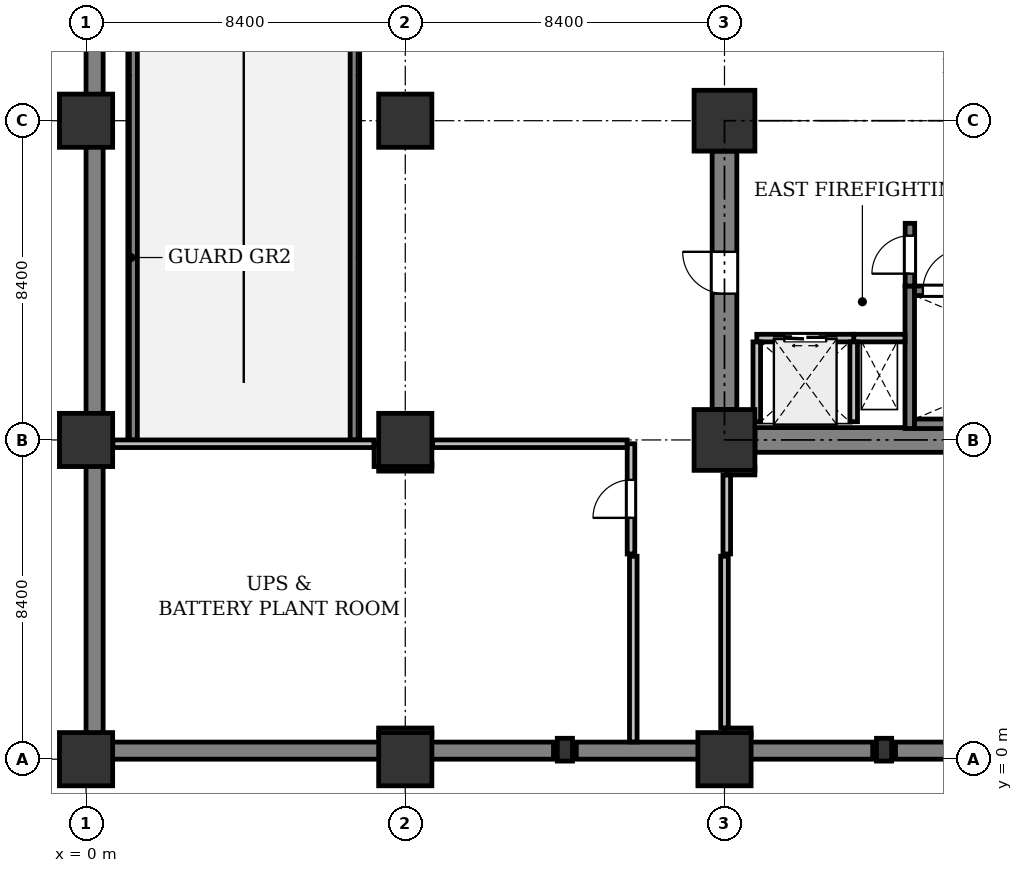
"""IFC4 building model, lengths in metres.
Left out: names, types, materials, properties, quantities, classifications, styles, units other than length and angle.
Written with IfcOpenShell. Run it as: python <this file> out.ifc"""

import sys

from ifc_helpers import new_model, si_unit, direction, frame, frame_2d, origin, origin_2d, place, context, subcontext, project, spatial, rectangle, extrude, element, fill, save


model = new_model("IFC4")
c1 = context("Model", 3, precision=1e-05, world=origin(), true_north=direction((0.0, 1.0)))
c2 = subcontext(c1, "Body", "Model", "MODEL_VIEW")
j1 = project(units=[si_unit("LENGTHUNIT", "METRE"), si_unit("PLANEANGLEUNIT", "RADIAN")], contexts=[c1])
p1 = place(None, origin())
s1 = spatial("IfcSite", under=j1, at=p1, CompositionType="ELEMENT")
p2 = place(p1, origin())
s2 = spatial("IfcBuilding", under=s1, at=p2, CompositionType="ELEMENT")
p3 = place(p2, frame((0.0, 0.0, -9.6)))
s3 = spatial("IfcBuildingStorey", under=s2, at=p3, CompositionType="ELEMENT", Elevation=-9.6)
p4 = place(p3, frame((0.0, 0.225, 0.0), z_axis=(0.0, 0.0, 1.0), x_axis=(1.0, 0.0, 0.0)))
e1 = element("IfcWall", 1, at=p4, inside=s3, PredefinedType="SOLIDWALL", context=c2, shape_type="SweptSolid", body=[
    extrude(rectangle(XDim=12.3, YDim=0.45, at=frame_2d((6.15, 0.0))), origin(), (0.0, 0.0, 1.0), 4.48),
])
for number, where, z_axis, x_axis in (
    (2, (12.9, 0.225, 0.0), (0.0, 0.0, 1.0), (1.0, 0.0, 0.0)),
    (3, (21.3, 0.225, 0.0), (0.0, 0.0, 1.0), (1.0, 0.0, 0.0)),
):
    element("IfcWall", number, at=place(p3, frame(where, z_axis=z_axis, x_axis=x_axis)), inside=s3, PredefinedType="SOLIDWALL", context=c2, shape_type="SweptSolid", body=[
        extrude(rectangle(XDim=7.8, YDim=0.45, at=frame_2d((3.9, 0.0))), origin(), (0.0, 0.0, 1.0), 4.48),
    ])
p5 = place(p3, frame((0.225, 0.45, 0.0), z_axis=(0.0, 0.0, 1.0), x_axis=(0.0, 1.0, 0.0)))
e4 = element("IfcWall", 4, at=p5, inside=s3, PredefinedType="SOLIDWALL", context=c2, shape_type="SweptSolid", body=[
    extrude(rectangle(XDim=49.5, YDim=0.45, at=frame_2d((24.75, 0.0))), origin(), (0.0, 0.0, 1.0), 4.48),
])
for number, where, z_axis, x_axis in (
    (5, (1.225, 8.4, 0.0), (0.0, 0.0, 1.0), (0.0, 1.0, 0.0)),
    (6, (7.075, 8.4, 0.0), (0.0, 0.0, 1.0), (0.0, 1.0, 0.0)),
):
    element("IfcWall", number, at=place(p3, frame(where, z_axis=z_axis, x_axis=x_axis)), inside=s3, PredefinedType="SHEAR", context=c2, shape_type="SweptSolid", body=[
        extrude(rectangle(XDim=38.4, YDim=0.25, at=frame_2d((19.2, 0.0))), origin(), (0.0, 0.0, 1.0), 4.48),
    ])
for number, where, z_axis, x_axis in (
    (7, (0.0, 0.0, 0.0), (0.0, 0.0, 1.0), (1.0, 0.0, 0.0)),
    (8, (0.0, 8.4, 0.0), (0.0, 0.0, 1.0), (1.0, 0.0, 0.0)),
    (9, (0.0, 16.8, 0.0), (0.0, 0.0, 1.0), (1.0, 0.0, 0.0)),
    (10, (8.4, 0.0, 0.0), (0.0, 0.0, 1.0), (1.0, 0.0, 0.0)),
    (11, (8.4, 8.4, 0.0), (0.0, 0.0, 1.0), (1.0, 0.0, 0.0)),
    (12, (8.4, 16.8, 0.0), (0.0, 0.0, 1.0), (1.0, 0.0, 0.0)),
    (13, (16.8, 0.0, 0.0), (0.0, 0.0, 1.0), (1.0, 0.0, 0.0)),
):
    element("IfcColumn", number, at=place(p3, frame(where, z_axis=z_axis, x_axis=x_axis)), inside=s3, PredefinedType="COLUMN", context=c2, shape_type="SweptSolid", body=[
        extrude(rectangle(XDim=1.4, YDim=1.4, at=origin_2d()), origin(), (0.0, 0.0, 1.0), 4.8),
    ])
for number, where, z_axis, x_axis in (
    (14, (16.8, 8.4, 0.0), (0.0, 0.0, 1.0), (1.0, 0.0, 0.0)),
    (15, (16.8, 16.8, 0.0), (0.0, 0.0, 1.0), (1.0, 0.0, 0.0)),
):
    element("IfcColumn", number, at=place(p3, frame(where, z_axis=z_axis, x_axis=x_axis)), inside=s3, PredefinedType="COLUMN", context=c2, shape_type="SweptSolid", body=[
        extrude(rectangle(XDim=1.6, YDim=1.6, at=origin_2d()), origin(), (0.0, 0.0, 1.0), 4.8),
    ])
for number, where, z_axis, x_axis in (
    (16, (12.6, 0.25, 0.0), (0.0, 0.0, 1.0), (1.0, 0.0, 0.0)),
    (17, (21.0, 0.25, 0.0), (0.0, 0.0, 1.0), (1.0, 0.0, 0.0)),
):
    element("IfcColumn", number, at=place(p3, frame(where, z_axis=z_axis, x_axis=x_axis)), inside=s3, PredefinedType="PILASTER", context=c2, shape_type="SweptSolid", body=[
        extrude(rectangle(XDim=0.4, YDim=0.6, at=origin_2d()), origin(), (0.0, 0.0, 1.0), 4.8),
    ])
p6 = place(p3, frame((17.6, 8.4, 0.0), z_axis=(0.0, 0.0, 1.0), x_axis=(1.0, 0.0, 0.0)))
e18 = element("IfcWall", 18, at=p6, inside=s3, PredefinedType="SHEAR", context=c2, shape_type="SweptSolid", body=[
    extrude(rectangle(XDim=6.8, YDim=0.65, at=frame_2d((3.4, 0.0))), origin(), (0.0, 0.0, 1.0), 4.48),
])
p7 = place(p3, frame((16.8, 9.2, 0.0), z_axis=(0.0, 0.0, 1.0), x_axis=(0.0, 1.0, 0.0)))
e19 = element("IfcWall", 19, at=p7, inside=s3, PredefinedType="SHEAR", context=c2, shape_type="SweptSolid", body=[
    extrude(rectangle(XDim=6.8, YDim=0.65, at=frame_2d((3.4, 0.0))), origin(), (0.0, 0.0, 1.0), 4.48),
])
p8 = place(p7, frame((3.05, 0.0, 0.0)))
e20 = element("IfcOpeningElement", 20, at=p8, cuts=e19, PredefinedType="OPENING", context=c2, shape_type="SweptSolid", body=[
    extrude(rectangle(XDim=1.1, YDim=2.15, at=frame_2d((0.55, 1.075))), frame((0.0, 0.335, 0.0), z_axis=(0.0, -1.0, 0.0), x_axis=(1.0, 0.0, 0.0)), (0.0, 0.0, 1.0), 0.67),
])
p9 = place(p3, frame((21.675, 8.7, 0.0), z_axis=(0.0, 0.0, 1.0), x_axis=(0.0, 1.0, 0.0)))
e21 = element("IfcWall", 21, at=p9, inside=s3, PredefinedType="SHEAR", context=c2, shape_type="SweptSolid", body=[
    extrude(rectangle(XDim=3.75, YDim=0.25, at=frame_2d((1.875, 0.0))), origin(), (0.0, 0.0, 1.0), 4.48),
])
p10 = place(p3, frame((21.8, 8.825, 0.0), z_axis=(0.0, 0.0, 1.0), x_axis=(1.0, 0.0, 0.0)))
e22 = element("IfcWall", 22, at=p10, inside=s3, PredefinedType="SHEAR", context=c2, shape_type="SweptSolid", body=[
    extrude(rectangle(XDim=7.75, YDim=0.25, at=frame_2d((3.875, 0.0))), origin(), (0.0, 0.0, 1.0), 4.48),
])
p11 = place(p3, frame((21.8, 12.325, 0.0), z_axis=(0.0, 0.0, 1.0), x_axis=(1.0, 0.0, 0.0)))
e23 = element("IfcWall", 23, at=p11, inside=s3, PredefinedType="SHEAR", context=c2, shape_type="SweptSolid", body=[
    extrude(rectangle(XDim=7.75, YDim=0.25, at=frame_2d((3.875, 0.0))), origin(), (0.0, 0.0, 1.0), 4.48),
])
p12 = place(p11, frame((0.22, 0.0, 0.0)))
e24 = element("IfcOpeningElement", 24, at=p12, cuts=e23, PredefinedType="OPENING", context=c2, shape_type="SweptSolid", body=[
    extrude(rectangle(XDim=1.1, YDim=2.15, at=frame_2d((0.55, 1.075))), frame((0.0, 0.135, 0.0), z_axis=(0.0, -1.0, 0.0), x_axis=(1.0, 0.0, 0.0)), (0.0, 0.0, 1.0), 0.27),
])
p13 = place(p3, frame((20.2, 11.08, 0.0), z_axis=(0.0, 0.0, 1.0), x_axis=(1.0, 0.0, 0.0)))
e25 = element("IfcWall", 25, at=p13, inside=s3, PredefinedType="PARTITIONING", context=c2, shape_type="SweptSolid", body=[
    extrude(rectangle(XDim=1.35, YDim=0.2, at=frame_2d((0.675, 0.0))), origin(), (0.0, 0.0, 1.0), 4.48),
])
p14 = place(p3, frame((21.68, 12.45, 0.0), z_axis=(0.0, 0.0, 1.0), x_axis=(0.0, 1.0, 0.0)))
e26 = element("IfcWall", 26, at=p14, inside=s3, PredefinedType="SHEAR", context=c2, shape_type="SweptSolid", body=[
    extrude(rectangle(XDim=1.65, YDim=0.25, at=frame_2d((0.825, 0.0))), origin(), (0.0, 0.0, 1.0), 4.48),
])
p15 = place(p14, frame((0.325, 0.0, 0.0)))
e27 = element("IfcOpeningElement", 27, at=p15, cuts=e26, PredefinedType="OPENING", context=c2, shape_type="SweptSolid", body=[
    extrude(rectangle(XDim=1.0, YDim=2.15, at=frame_2d((0.5, 1.075))), frame((0.0, 0.135, 0.0), z_axis=(0.0, -1.0, 0.0), x_axis=(1.0, 0.0, 0.0)), (0.0, 0.0, 1.0), 0.27),
])
p16 = place(p3, frame((17.65, 11.08, 0.0), z_axis=(0.0, 0.0, 1.0), x_axis=(1.0, 0.0, 0.0)))
e28 = element("IfcWall", 28, at=p16, inside=s3, PredefinedType="PARTITIONING", context=c2, shape_type="SweptSolid", body=[
    extrude(rectangle(XDim=2.55, YDim=0.2, at=frame_2d((1.275, 0.0))), origin(), (0.0, 0.0, 1.0), 4.48),
])
p17 = place(p16, frame((0.725, 0.0, 0.0)))
e29 = element("IfcOpeningElement", 29, at=p17, cuts=e28, PredefinedType="OPENING", context=c2, shape_type="SweptSolid", body=[
    extrude(rectangle(XDim=1.1, YDim=2.2, at=frame_2d((0.55, 1.1))), frame((0.0, 0.11, 0.0), z_axis=(0.0, -1.0, 0.0), x_axis=(1.0, 0.0, 0.0)), (0.0, 0.0, 1.0), 0.22),
])
for number, where, z_axis, x_axis in (
    (30, (20.2, 8.88, 0.0), (0.0, 0.0, 1.0), (0.0, 1.0, 0.0)),
    (31, (17.65, 8.88, 0.0), (0.0, 0.0, 1.0), (0.0, 1.0, 0.0)),
):
    element("IfcWall", number, at=place(p3, frame(where, z_axis=z_axis, x_axis=x_axis)), inside=s3, PredefinedType="PARTITIONING", context=c2, shape_type="SweptSolid", body=[
        extrude(rectangle(XDim=2.1, YDim=0.2, at=frame_2d((1.05, 0.0))), origin(), (0.0, 0.0, 1.0), 4.48),
    ])
p18 = place(p3, frame((0.72, 17.502, 0.0), z_axis=(0.0, 0.0, 1.0), x_axis=(0.0, -1.0, 0.0)))
e32 = element("IfcWall", 32, at=p18, inside=s3, PredefinedType="PARTITIONING", context=c2, shape_type="SweptSolid", body=[
    extrude(rectangle(XDim=1.402, YDim=0.2, at=frame_2d((0.701, 0.0))), origin(), (0.0, 0.0, 1.0), 4.48),
])
p19 = place(p3, frame((0.72, 9.1, 0.0), z_axis=(0.0, 0.0, 1.0), x_axis=(0.0, -1.0, 0.0)))
e33 = element("IfcWall", 33, at=p19, inside=s3, PredefinedType="PARTITIONING", context=c2, shape_type="SweptSolid", body=[
    extrude(rectangle(XDim=1.4, YDim=0.2, at=frame_2d((0.7, 0.0))), origin(), (0.0, 0.0, 1.0), 4.48),
])
p20 = place(p3, frame((7.7, 0.72, 0.0), z_axis=(0.0, 0.0, 1.0), x_axis=(1.0, 0.0, 0.0)))
e34 = element("IfcWall", 34, at=p20, inside=s3, PredefinedType="PARTITIONING", context=c2, shape_type="SweptSolid", body=[
    extrude(rectangle(XDim=1.4, YDim=0.2, at=frame_2d((0.7, 0.0))), origin(), (0.0, 0.0, 1.0), 3.868),
])
p21 = place(p3, frame((16.1, 0.72, 0.0), z_axis=(0.0, 0.0, 1.0), x_axis=(1.0, 0.0, 0.0)))
e35 = element("IfcWall", 35, at=p21, inside=s3, PredefinedType="PARTITIONING", context=c2, shape_type="SweptSolid", body=[
    extrude(rectangle(XDim=0.7, YDim=0.2, at=frame_2d((0.35, 0.0))), origin(), (0.0, 0.0, 1.0), 3.868),
])
p22 = place(p3, frame((16.8, 0.824, 0.0), z_axis=(0.0, 0.0, 1.0), x_axis=(0.0, 1.0, 0.0)))
e36 = element("IfcWall", 36, at=p22, inside=s3, PredefinedType="PARTITIONING", context=c2, shape_type="SweptSolid", body=[
    extrude(rectangle(XDim=4.416, YDim=0.2, at=frame_2d((2.208, 0.0))), origin(), (0.0, 0.0, 1.0), 3.868),
])
p23 = place(p3, frame((16.696, 5.24, 0.0), z_axis=(0.0, 0.0, 1.0), x_axis=(-1.0, 0.0, 0.0)))
e37 = element("IfcWall", 37, at=p23, inside=s3, PredefinedType="PARTITIONING", context=c2, shape_type="SweptSolid", body=[
    extrude(rectangle(XDim=2.896, YDim=0.2, at=frame_2d((1.448, 0.0))), origin(), (0.0, 0.0, 1.0), 3.868),
])
p24 = place(p3, frame((13.74, 5.294, 0.0), z_axis=(0.0, 0.0, 1.0), x_axis=(-1.9936602e-05, 0.999999999801, 0.0)))
e38 = element("IfcWall", 38, at=p24, inside=s3, PredefinedType="PARTITIONING", context=c2, shape_type="SweptSolid", body=[
    extrude(rectangle(XDim=12.246, YDim=0.2, at=frame_2d((6.123, 0.0))), origin(), (0.0, 0.0, 1.0), 3.78),
])
p25 = place(p24, frame((5.623, 0.0, 0.0)))
e39 = element("IfcOpeningElement", 39, at=p25, cuts=e38, PredefinedType="OPENING", context=c2, shape_type="SweptSolid", body=[
    extrude(rectangle(XDim=1.0, YDim=2.15, at=frame_2d((0.5, 1.075))), frame((0.0, 0.11, 0.0), z_axis=(0.0, -1.0, 0.0), x_axis=(1.0, 0.0, 0.0)), (0.0, 0.0, 1.0), 0.22),
])
p26 = place(p3, frame((13.74, 17.54, 0.0), z_axis=(0.0, 0.0, 1.0), x_axis=(-1.0, 0.0, 0.0)))
e40 = element("IfcWall", 40, at=p26, inside=s3, PredefinedType="PARTITIONING", context=c2, shape_type="SweptSolid", body=[
    extrude(rectangle(XDim=6.536, YDim=0.2, at=frame_2d((3.268, 0.0))), origin(), (0.0, 0.0, 1.0), 3.868),
])
p27 = place(p3, frame((6.946, 17.54, 0.0), z_axis=(0.0, 0.0, 1.0), x_axis=(-1.0, 0.0, 0.0)))
e41 = element("IfcWall", 41, at=p27, inside=s3, PredefinedType="PARTITIONING", context=c2, shape_type="SweptSolid", body=[
    extrude(rectangle(XDim=1.546, YDim=0.2, at=frame_2d((0.773, 0.0))), origin(), (0.0, 0.0, 1.0), 4.48),
])
p28 = place(p3, frame((5.34, 17.6, 0.0), z_axis=(0.0, 0.0, 1.0), x_axis=(-1.0, 0.0, 0.0)))
e42 = element("IfcWall", 42, at=p28, inside=s3, PredefinedType="PARTITIONING", context=c2, shape_type="SweptSolid", body=[
    extrude(rectangle(XDim=3.986, YDim=0.2, at=frame_2d((1.993, 0.0))), origin(), (0.0, 0.0, 1.0), 4.48),
])
p29 = place(p3, frame((1.096, 17.6, 0.0), z_axis=(0.0, 0.0, 1.0), x_axis=(-1.0, 0.0, 0.0)))
e43 = element("IfcWall", 43, at=p29, inside=s3, PredefinedType="PARTITIONING", context=c2, shape_type="SweptSolid", body=[
    extrude(rectangle(XDim=0.642, YDim=0.2, at=frame_2d((0.321, 0.0))), origin(), (0.0, 0.0, 1.0), 4.48),
])
p30 = place(p8, origin())
e44 = element("IfcDoor", 44, at=p30, inside=s3, OperationType="SINGLE_SWING_RIGHT", PredefinedType="DOOR", context=c2, shape_type="SweptSolid", body=[
    extrude(rectangle(XDim=1.1, YDim=2.15, at=frame_2d((0.55, 1.075))), frame((0.0, 0.025, 0.0), z_axis=(0.0, -1.0, 0.0), x_axis=(1.0, 0.0, 0.0)), (0.0, 0.0, 1.0), 0.05),
])
fill(e20, e44)
p31 = place(p12, origin())
e45 = element("IfcDoor", 45, at=p31, inside=s3, OperationType="SINGLE_SWING_RIGHT", PredefinedType="DOOR", context=c2, shape_type="SweptSolid", body=[
    extrude(rectangle(XDim=1.1, YDim=2.15, at=frame_2d((0.55, 1.075))), frame((0.0, 0.025, 0.0), z_axis=(0.0, -1.0, 0.0), x_axis=(1.0, 0.0, 0.0)), (0.0, 0.0, 1.0), 0.05),
])
fill(e24, e45)
p32 = place(p15, origin())
e46 = element("IfcDoor", 46, at=p32, inside=s3, OperationType="SINGLE_SWING_LEFT", PredefinedType="DOOR", context=c2, shape_type="SweptSolid", body=[
    extrude(rectangle(XDim=1.0, YDim=2.15, at=frame_2d((0.5, 1.075))), frame((0.0, 0.025, 0.0), z_axis=(0.0, -1.0, 0.0), x_axis=(1.0, 0.0, 0.0)), (0.0, 0.0, 1.0), 0.05),
])
fill(e27, e46)
p33 = place(p17, origin())
e47 = element("IfcDoor", 47, at=p33, inside=s3, OperationType="DOUBLE_DOOR_SLIDING", PredefinedType="DOOR", context=c2, shape_type="SweptSolid", body=[
    extrude(rectangle(XDim=1.1, YDim=2.2, at=frame_2d((0.55, 1.1))), frame((0.0, 0.025, 0.0), z_axis=(0.0, -1.0, 0.0), x_axis=(1.0, 0.0, 0.0)), (0.0, 0.0, 1.0), 0.05),
])
fill(e29, e47)
p34 = place(p25, origin())
e48 = element("IfcDoor", 48, at=p34, inside=s3, OperationType="SINGLE_SWING_RIGHT", PredefinedType="DOOR", context=c2, shape_type="SweptSolid", body=[
    extrude(rectangle(XDim=1.0, YDim=2.15, at=frame_2d((0.5, 1.075))), frame((0.0, 0.025, 0.0), z_axis=(0.0, -1.0, 0.0), x_axis=(1.0, 0.0, 0.0)), (0.0, 0.0, 1.0), 0.05),
])
fill(e39, e48)
save(model, sys.argv[1])
